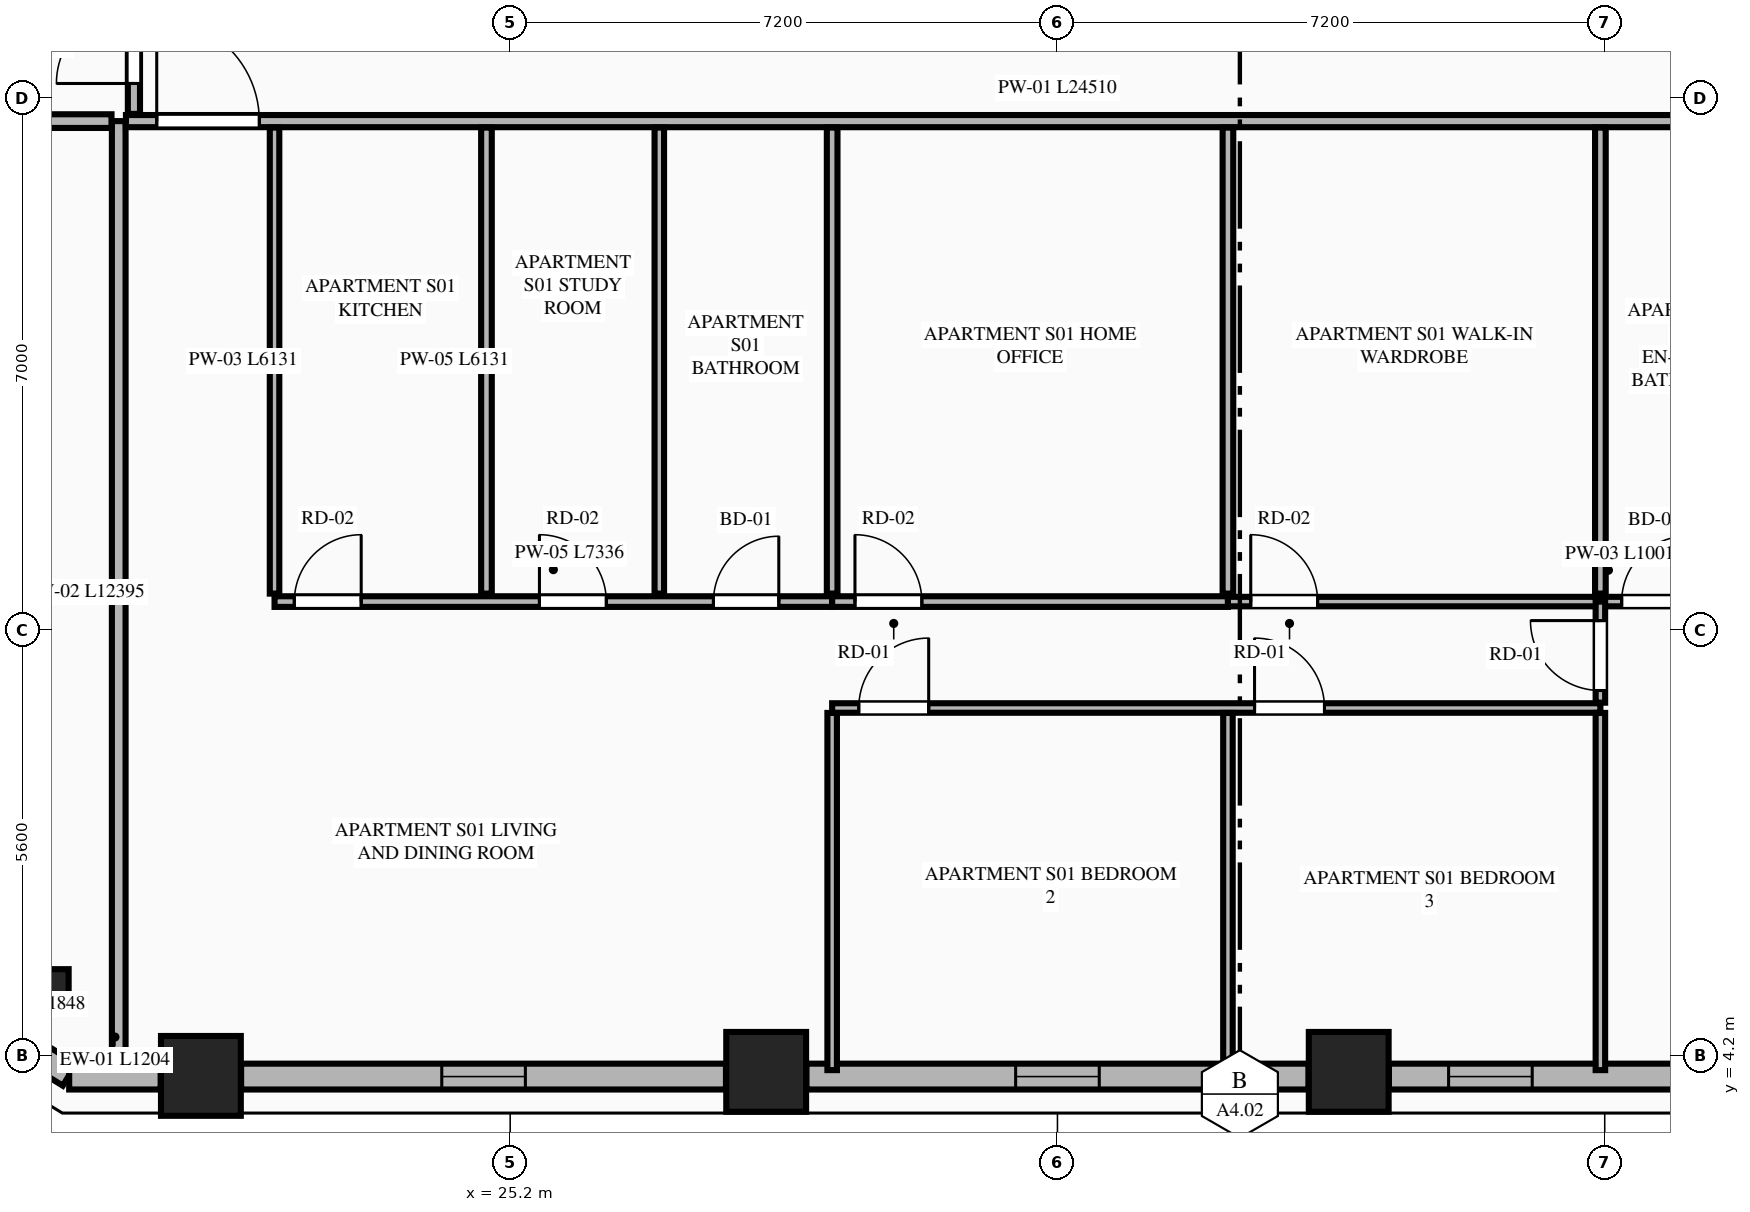
"""IFC4 building model, lengths in metres.
Left out: names, types, materials, properties, quantities, classifications, styles, units other than length and angle.
Written with IfcOpenShell. Run it as: python <this file> out.ifc"""

import sys

from ifc_helpers import new_model, si_unit, direction, frame, frame_2d, origin, origin_2d, place, context, subcontext, project, spatial, rectangle, extrude, element, fill, save


model = new_model("IFC4")
c1 = context("Model", 3, precision=1e-05, world=origin(), true_north=direction((0.0, 1.0)))
c2 = subcontext(c1, "Body", "Model", "MODEL_VIEW")
j1 = project(units=[si_unit("LENGTHUNIT", "METRE"), si_unit("PLANEANGLEUNIT", "RADIAN")], contexts=[c1])
p1 = place(None, origin())
s1 = spatial("IfcSite", under=j1, at=p1, CompositionType="ELEMENT")
p2 = place(p1, origin())
s2 = spatial("IfcBuilding", under=s1, at=p2, CompositionType="ELEMENT")
p3 = place(p2, frame((0.0, 0.0, 123.25)))
s3 = spatial("IfcBuildingStorey", under=s2, at=p3, CompositionType="ELEMENT", Elevation=123.25)
for number, where, z_axis, x_axis in (
    (1, (21.131, 3.939, 0.0), (0.0, 0.0, 1.0), (1.0, 0.0, 0.0)),
    (2, (28.568, 3.992, 0.0), (0.0, 0.0, 1.0), (1.0, 0.0, 0.0)),
    (3, (36.232, 3.992, 0.0), (0.0, 0.0, 1.0), (1.0, 0.0, 0.0)),
):
    element("IfcColumn", number, at=place(p3, frame(where, z_axis=z_axis, x_axis=x_axis)), inside=s3, PredefinedType="COLUMN", context=c2, shape_type="SweptSolid", body=[
        extrude(rectangle(XDim=1.05, YDim=1.05, at=origin_2d()), origin(), (0.0, 0.0, 1.0), 3.55),
    ])
p4 = place(p3, frame((19.141, 5.093, 0.0), z_axis=(0.0, 0.0, 1.0), x_axis=(0.865160173452, -0.501495637342, 0.0)))
e4 = element("IfcColumn", 4, at=p4, inside=s3, PredefinedType="PILASTER", context=c2, shape_type="SweptSolid", body=[
    extrude(rectangle(XDim=0.5, YDim=0.35, at=origin_2d()), origin(), (0.0, 0.0, 1.0), 3.55),
])
p5 = place(p3, frame((17.829, 4.923, 0.0), z_axis=(0.0, 0.0, 1.0), x_axis=(0.851798915137, -0.523868884523, 0.0)))
e5 = element("IfcWall", 5, at=p5, inside=s3, PredefinedType="STANDARD", context=c2, shape_type="SweptSolid", body=[
    extrude(rectangle(XDim=1.848, YDim=0.34, at=frame_2d((0.924, 0.0))), origin(), (0.0, 0.0, 1.0), 3.34),
])
p6 = place(p3, frame((19.398, 3.93, 0.0), z_axis=(0.0, 0.0, 1.0), x_axis=(1.0, 0.0, 0.0)))
e6 = element("IfcWall", 6, at=p6, inside=s3, PredefinedType="STANDARD", context=c2, shape_type="SweptSolid", body=[
    extrude(rectangle(XDim=1.204, YDim=0.34, at=frame_2d((0.602, 0.0))), origin(), (0.0, 0.0, 1.0), 3.34),
])
p7 = place(p3, frame((21.66, 3.93, 0.0), z_axis=(0.0, 0.0, 1.0), x_axis=(1.0, 0.0, 0.0)))
e7 = element("IfcWall", 7, at=p7, inside=s3, PredefinedType="STANDARD", context=c2, shape_type="SweptSolid", body=[
    extrude(rectangle(XDim=6.379, YDim=0.34, at=frame_2d((3.189, 0.0))), origin(), (0.0, 0.0, 1.0), 2.797),
])
p8 = place(p7, frame((2.64, 0.0, 0.75)))
e8 = element("IfcOpeningElement", 8, at=p8, cuts=e7, PredefinedType="OPENING", context=c2, shape_type="SweptSolid", body=[
    extrude(rectangle(XDim=1.1, YDim=1.897, at=frame_2d((0.55, 0.948))), frame((0.0, 0.18, 0.0), z_axis=(0.0, -1.0, 0.0), x_axis=(1.0, 0.0, 0.0)), (0.0, 0.0, 1.0), 0.36),
])
p9 = place(p3, frame((29.097, 3.93, 0.0), z_axis=(0.0, 0.0, 1.0), x_axis=(1.0, 0.0, 0.0)))
e9 = element("IfcWall", 9, at=p9, inside=s3, PredefinedType="STANDARD", context=c2, shape_type="SweptSolid", body=[
    extrude(rectangle(XDim=6.606, YDim=0.34, at=frame_2d((3.303, 0.0))), origin(), (0.0, 0.0, 1.0), 2.797),
])
p10 = place(p9, frame((2.753, 0.0, 0.75)))
e10 = element("IfcOpeningElement", 10, at=p10, cuts=e9, PredefinedType="OPENING", context=c2, shape_type="SweptSolid", body=[
    extrude(rectangle(XDim=1.1, YDim=1.897, at=frame_2d((0.55, 0.948))), frame((0.0, 0.18, 0.0), z_axis=(0.0, -1.0, 0.0), x_axis=(1.0, 0.0, 0.0)), (0.0, 0.0, 1.0), 0.36),
])
p11 = place(p3, frame((36.761, 3.93, 0.0), z_axis=(0.0, 0.0, 1.0), x_axis=(1.0, 0.0, 0.0)))
e11 = element("IfcWall", 11, at=p11, inside=s3, PredefinedType="STANDARD", context=c2, shape_type="SweptSolid", body=[
    extrude(rectangle(XDim=6.379, YDim=0.34, at=frame_2d((3.189, 0.0))), origin(), (0.0, 0.0, 1.0), 2.797),
])
p12 = place(p11, frame((0.785, 0.0, 0.75)))
e12 = element("IfcOpeningElement", 12, at=p12, cuts=e11, PredefinedType="OPENING", context=c2, shape_type="SweptSolid", body=[
    extrude(rectangle(XDim=1.1, YDim=1.897, at=frame_2d((0.55, 0.948))), frame((0.0, 0.18, 0.0), z_axis=(0.0, -1.0, 0.0), x_axis=(1.0, 0.0, 0.0)), (0.0, 0.0, 1.0), 0.36),
])
p13 = place(p11, frame((4.087, 0.0, 0.75)))
e13 = element("IfcOpeningElement", 13, at=p13, cuts=e11, PredefinedType="OPENING", context=c2, shape_type="SweptSolid", body=[
    extrude(rectangle(XDim=1.1, YDim=1.897, at=frame_2d((0.55, 0.948))), frame((0.0, 0.18, 0.0), z_axis=(0.0, -1.0, 0.0), x_axis=(1.0, 0.0, 0.0)), (0.0, 0.0, 1.0), 0.36),
])
p14 = place(p3, frame((20.05, 4.105, 0.0), z_axis=(0.0, 0.0, 1.0), x_axis=(0.0, 1.0, 0.0)))
e14 = element("IfcWall", 14, at=p14, inside=s3, PredefinedType="PARTITIONING", context=c2, shape_type="SweptSolid", body=[
    extrude(rectangle(XDim=12.395, YDim=0.18, at=frame_2d((6.198, 0.0))), origin(), (0.0, 0.0, 1.0), 3.34),
])
p15 = place(p3, frame((20.145, 16.5, 0.0), z_axis=(0.0, 0.0, 1.0), x_axis=(1.0, 0.0, 0.0)))
e15 = element("IfcWall", 15, at=p15, inside=s3, PredefinedType="PARTITIONING", context=c2, shape_type="SweptSolid", body=[
    extrude(rectangle(XDim=24.51, YDim=0.16, at=frame_2d((12.255, 0.0))), origin(), (0.0, 0.0, 1.0), 3.34),
])
p16 = place(p15, frame((0.405, 0.0, 0.0)))
e16 = element("IfcOpeningElement", 16, at=p16, cuts=e15, PredefinedType="OPENING", context=c2, shape_type="SweptSolid", body=[
    extrude(rectangle(XDim=1.35, YDim=2.35, at=frame_2d((0.675, 1.175))), frame((0.0, 0.09, 0.0), z_axis=(0.0, -1.0, 0.0), x_axis=(1.0, 0.0, 0.0)), (0.0, 0.0, 1.0), 0.18),
])
p17 = place(p3, frame((22.1, 10.284, 0.0), z_axis=(0.0, 0.0, 1.0), x_axis=(0.0, 1.0, 0.0)))
e17 = element("IfcWall", 17, at=p17, inside=s3, PredefinedType="PARTITIONING", context=c2, shape_type="SweptSolid", body=[
    extrude(rectangle(XDim=6.131, YDim=0.125, at=frame_2d((3.065, 0.0))), origin(), (0.0, 0.0, 1.0), 2.722),
])
p18 = place(p3, frame((22.1, 10.179, 0.0), z_axis=(0.0, 0.0, 1.0), x_axis=(1.0, 0.0, 0.0)))
e18 = element("IfcWall", 18, at=p18, inside=s3, PredefinedType="PLUMBINGWALL", context=c2, shape_type="SweptSolid", body=[
    extrude(rectangle(XDim=7.336, YDim=0.14, at=frame_2d((3.668, 0.0))), origin(), (0.0, 0.0, 1.0), 3.34),
])
p19 = place(p18, frame((5.774, 0.0, 0.0)))
e19 = element("IfcOpeningElement", 19, at=p19, cuts=e18, PredefinedType="OPENING", context=c2, shape_type="SweptSolid", body=[
    extrude(rectangle(XDim=0.86, YDim=2.1, at=frame_2d((0.43, 1.05))), frame((0.0, 0.08, 0.0), z_axis=(0.0, -1.0, 0.0), x_axis=(1.0, 0.0, 0.0)), (0.0, 0.0, 1.0), 0.16),
])
p20 = place(p18, frame((0.26, 0.0, 0.0)))
e20 = element("IfcOpeningElement", 20, at=p20, cuts=e18, PredefinedType="OPENING", context=c2, shape_type="SweptSolid", body=[
    extrude(rectangle(XDim=0.88, YDim=2.15, at=frame_2d((0.44, 1.075))), frame((0.0, 0.08, 0.0), z_axis=(0.0, -1.0, 0.0), x_axis=(1.0, 0.0, 0.0)), (0.0, 0.0, 1.0), 0.16),
])
p21 = place(p18, frame((3.485, 0.0, 0.0)))
e21 = element("IfcOpeningElement", 21, at=p21, cuts=e18, PredefinedType="OPENING", context=c2, shape_type="SweptSolid", body=[
    extrude(rectangle(XDim=0.88, YDim=2.15, at=frame_2d((0.44, 1.075))), frame((0.0, 0.08, 0.0), z_axis=(0.0, -1.0, 0.0), x_axis=(1.0, 0.0, 0.0)), (0.0, 0.0, 1.0), 0.16),
])
p22 = place(p3, frame((29.436, 10.179, 0.0), z_axis=(0.0, 0.0, 1.0), x_axis=(1.0, 0.0, 0.0)))
e22 = element("IfcWall", 22, at=p22, inside=s3, PredefinedType="PLUMBINGWALL", context=c2, shape_type="SweptSolid", body=[
    extrude(rectangle(XDim=5.207, YDim=0.14, at=frame_2d((2.604, 0.0))), origin(), (0.0, 0.0, 1.0), 3.34),
])
p23 = place(p22, frame((0.3, 0.0, 0.0)))
e23 = element("IfcOpeningElement", 23, at=p23, cuts=e22, PredefinedType="OPENING", context=c2, shape_type="SweptSolid", body=[
    extrude(rectangle(XDim=0.88, YDim=2.15, at=frame_2d((0.44, 1.075))), frame((0.0, 0.08, 0.0), z_axis=(0.0, -1.0, 0.0), x_axis=(1.0, 0.0, 0.0)), (0.0, 0.0, 1.0), 0.16),
])
p24 = place(p3, frame((34.643, 10.179, 0.0), z_axis=(0.0, 0.0, 1.0), x_axis=(1.0, 0.0, 0.0)))
e24 = element("IfcWall", 24, at=p24, inside=s3, PredefinedType="PARTITIONING", context=c2, shape_type="SweptSolid", body=[
    extrude(rectangle(XDim=10.012, YDim=0.125, at=frame_2d((5.006, 0.0))), origin(), (0.0, 0.0, 1.0), 3.34),
])
p25 = place(p24, frame((5.18, 0.0, 0.0)))
e25 = element("IfcOpeningElement", 25, at=p25, cuts=e24, PredefinedType="OPENING", context=c2, shape_type="SweptSolid", body=[
    extrude(rectangle(XDim=0.86, YDim=2.1, at=frame_2d((0.43, 1.05))), frame((0.0, 0.073, 0.0), z_axis=(0.0, -1.0, 0.0), x_axis=(1.0, 0.0, 0.0)), (0.0, 0.0, 1.0), 0.145),
])
p26 = place(p24, frame((7.42, 0.0, 0.0)))
e26 = element("IfcOpeningElement", 26, at=p26, cuts=e24, PredefinedType="OPENING", context=c2, shape_type="SweptSolid", body=[
    extrude(rectangle(XDim=0.88, YDim=2.15, at=frame_2d((0.44, 1.075))), frame((0.0, 0.073, 0.0), z_axis=(0.0, -1.0, 0.0), x_axis=(1.0, 0.0, 0.0)), (0.0, 0.0, 1.0), 0.145),
])
p27 = place(p24, frame((0.3, 0.0, 0.0)))
e27 = element("IfcOpeningElement", 27, at=p27, cuts=e24, PredefinedType="OPENING", context=c2, shape_type="SweptSolid", body=[
    extrude(rectangle(XDim=0.88, YDim=2.15, at=frame_2d((0.44, 1.075))), frame((0.0, 0.073, 0.0), z_axis=(0.0, -1.0, 0.0), x_axis=(1.0, 0.0, 0.0)), (0.0, 0.0, 1.0), 0.145),
])
p28 = place(p3, frame((24.888, 10.284, 0.0), z_axis=(0.0, 0.0, 1.0), x_axis=(0.0, 1.0, 0.0)))
e28 = element("IfcWall", 28, at=p28, inside=s3, PredefinedType="PLUMBINGWALL", context=c2, shape_type="SweptSolid", body=[
    extrude(rectangle(XDim=6.131, YDim=0.14, at=frame_2d((3.065, 0.0))), origin(), (0.0, 0.0, 1.0), 3.34),
])
p29 = place(p3, frame((27.162, 10.284, 0.0), z_axis=(0.0, 0.0, 1.0), x_axis=(0.0, 1.0, 0.0)))
e29 = element("IfcWall", 29, at=p29, inside=s3, PredefinedType="PARTITIONING", context=c2, shape_type="SweptSolid", body=[
    extrude(rectangle(XDim=6.131, YDim=0.125, at=frame_2d((3.065, 0.0))), origin(), (0.0, 0.0, 1.0), 3.34),
])
p30 = place(p3, frame((29.436, 4.015, 0.0), z_axis=(0.0, 0.0, 1.0), x_axis=(0.0, 1.0, 0.0)))
e30 = element("IfcWall", 30, at=p30, inside=s3, PredefinedType="PARTITIONING", context=c2, shape_type="SweptSolid", body=[
    extrude(rectangle(XDim=4.699, YDim=0.125, at=frame_2d((2.35, 0.0))), origin(), (0.0, 0.0, 1.0), 3.34),
])
p31 = place(p3, frame((29.436, 8.779, 0.0), z_axis=(0.0, 0.0, 1.0), x_axis=(1.0, 0.0, 0.0)))
e31 = element("IfcWall", 31, at=p31, inside=s3, PredefinedType="PARTITIONING", context=c2, shape_type="SweptSolid", body=[
    extrude(rectangle(XDim=10.107, YDim=0.125, at=frame_2d((5.053, 0.0))), origin(), (0.0, 0.0, 1.0), 3.34),
])
p32 = place(p31, frame((0.35, 0.0, 0.0)))
e32 = element("IfcOpeningElement", 32, at=p32, cuts=e31, PredefinedType="OPENING", context=c2, shape_type="SweptSolid", body=[
    extrude(rectangle(XDim=0.92, YDim=2.15, at=frame_2d((0.46, 1.075))), frame((0.0, 0.073, 0.0), z_axis=(0.0, -1.0, 0.0), x_axis=(1.0, 0.0, 0.0)), (0.0, 0.0, 1.0), 0.145),
])
p33 = place(p31, frame((5.557, 0.0, 0.0)))
e33 = element("IfcOpeningElement", 33, at=p33, cuts=e31, PredefinedType="OPENING", context=c2, shape_type="SweptSolid", body=[
    extrude(rectangle(XDim=0.92, YDim=2.15, at=frame_2d((0.46, 1.075))), frame((0.0, 0.073, 0.0), z_axis=(0.0, -1.0, 0.0), x_axis=(1.0, 0.0, 0.0)), (0.0, 0.0, 1.0), 0.145),
])
p34 = place(p3, frame((39.543, 8.849, 0.0), z_axis=(0.0, 0.0, 1.0), x_axis=(0.0, 1.0, 0.0)))
e34 = element("IfcWall", 34, at=p34, inside=s3, PredefinedType="PARTITIONING", context=c2, shape_type="SweptSolid", body=[
    extrude(rectangle(XDim=1.33, YDim=0.125, at=frame_2d((0.665, 0.0))), origin(), (0.0, 0.0, 1.0), 3.34),
])
p35 = place(p34, frame((0.16, 0.0, 0.0)))
e35 = element("IfcOpeningElement", 35, at=p35, cuts=e34, PredefinedType="OPENING", context=c2, shape_type="SweptSolid", body=[
    extrude(rectangle(XDim=0.92, YDim=2.15, at=frame_2d((0.46, 1.075))), frame((0.0, 0.073, 0.0), z_axis=(0.0, -1.0, 0.0), x_axis=(1.0, 0.0, 0.0)), (0.0, 0.0, 1.0), 0.145),
])
for number, where, z_axis, x_axis in (
    (36, (29.436, 10.284, 0.0), (0.0, 0.0, 1.0), (0.0, 1.0, 0.0)),
    (37, (34.643, 10.284, 0.0), (0.0, 0.0, 1.0), (0.0, 1.0, 0.0)),
):
    element("IfcWall", number, at=place(p3, frame(where, z_axis=z_axis, x_axis=x_axis)), inside=s3, PredefinedType="PLUMBINGWALL", context=c2, shape_type="SweptSolid", body=[
        extrude(rectangle(XDim=6.131, YDim=0.14, at=frame_2d((3.065, 0.0))), origin(), (0.0, 0.0, 1.0), 3.34),
    ])
for number, where, z_axis, x_axis in (
    (38, (34.643, 4.015, 0.0), (0.0, 0.0, 1.0), (0.0, 1.0, 0.0)),
    (39, (39.543, 4.015, 0.0), (0.0, 0.0, 1.0), (0.0, 1.0, 0.0)),
):
    element("IfcWall", number, at=place(p3, frame(where, z_axis=z_axis, x_axis=x_axis)), inside=s3, PredefinedType="PARTITIONING", context=c2, shape_type="SweptSolid", body=[
        extrude(rectangle(XDim=4.699, YDim=0.125, at=frame_2d((2.35, 0.0))), origin(), (0.0, 0.0, 1.0), 3.34),
    ])
p36 = place(p3, frame((39.543, 10.284, 0.0), z_axis=(0.0, 0.0, 1.0), x_axis=(0.0, 1.0, 0.0)))
e40 = element("IfcWall", 40, at=p36, inside=s3, PredefinedType="PLUMBINGWALL", context=c2, shape_type="SweptSolid", body=[
    extrude(rectangle(XDim=6.131, YDim=0.14, at=frame_2d((3.065, 0.0))), origin(), (0.0, 0.0, 1.0), 3.34),
])
p37 = place(p3, frame((12.185, 16.5, 0.0), z_axis=(0.0, 0.0, 1.0), x_axis=(1.0, 0.0, 0.0)))
e41 = element("IfcWall", 41, at=p37, inside=s3, PredefinedType="PARTITIONING", context=c2, shape_type="SweptSolid", body=[
    extrude(rectangle(XDim=7.77, YDim=0.18, at=frame_2d((3.885, 0.0))), origin(), (0.0, 0.0, 1.0), 3.34),
])
p38 = place(p3, frame((20.25, 16.595, 0.0), z_axis=(0.0, 0.0, 1.0), x_axis=(0.0, 1.0, 0.0)))
e42 = element("IfcWall", 42, at=p38, inside=s3, PredefinedType="PARTITIONING", context=c2, shape_type="SweptSolid", body=[
    extrude(rectangle(XDim=6.202, YDim=0.16, at=frame_2d((3.101, 0.0))), origin(), (0.0, 0.0, 1.0), 3.34),
])
p39 = place(p38, frame((0.4, 0.0, 0.0)))
e43 = element("IfcOpeningElement", 43, at=p39, cuts=e42, PredefinedType="OPENING", context=c2, shape_type="SweptSolid", body=[
    extrude(rectangle(XDim=1.02, YDim=2.25, at=frame_2d((0.51, 1.125))), frame((0.0, 0.09, 0.0), z_axis=(0.0, -1.0, 0.0), x_axis=(1.0, 0.0, 0.0)), (0.0, 0.0, 1.0), 0.18),
])
p40 = place(p8, origin())
e44 = element("IfcWindow", 44, at=p40, inside=s3, PartitioningType="SINGLE_PANEL", PredefinedType="WINDOW", context=c2, shape_type="SweptSolid", body=[
    extrude(rectangle(XDim=1.1, YDim=1.897, at=frame_2d((0.55, 0.948))), frame((0.0, 0.03, 0.0), z_axis=(0.0, -1.0, 0.0), x_axis=(1.0, 0.0, 0.0)), (0.0, 0.0, 1.0), 0.06),
])
fill(e8, e44)
p41 = place(p10, origin())
e45 = element("IfcWindow", 45, at=p41, inside=s3, PartitioningType="SINGLE_PANEL", PredefinedType="WINDOW", context=c2, shape_type="SweptSolid", body=[
    extrude(rectangle(XDim=1.1, YDim=1.897, at=frame_2d((0.55, 0.948))), frame((0.0, 0.03, 0.0), z_axis=(0.0, -1.0, 0.0), x_axis=(1.0, 0.0, 0.0)), (0.0, 0.0, 1.0), 0.06),
])
fill(e10, e45)
p42 = place(p12, origin())
e46 = element("IfcWindow", 46, at=p42, inside=s3, PartitioningType="SINGLE_PANEL", PredefinedType="WINDOW", context=c2, shape_type="SweptSolid", body=[
    extrude(rectangle(XDim=1.1, YDim=1.897, at=frame_2d((0.55, 0.948))), frame((0.0, 0.03, 0.0), z_axis=(0.0, -1.0, 0.0), x_axis=(1.0, 0.0, 0.0)), (0.0, 0.0, 1.0), 0.06),
])
fill(e12, e46)
p43 = place(p19, origin())
e47 = element("IfcDoor", 47, at=p43, inside=s3, OperationType="SINGLE_SWING_RIGHT", PredefinedType="DOOR", context=c2, shape_type="SweptSolid", body=[
    extrude(rectangle(XDim=0.86, YDim=2.1, at=frame_2d((0.43, 1.05))), frame((0.0, 0.025, 0.0), z_axis=(0.0, -1.0, 0.0), x_axis=(1.0, 0.0, 0.0)), (0.0, 0.0, 1.0), 0.05),
])
fill(e19, e47)
p44 = place(p25, origin())
e48 = element("IfcDoor", 48, at=p44, inside=s3, OperationType="SINGLE_SWING_RIGHT", PredefinedType="DOOR", context=c2, shape_type="SweptSolid", body=[
    extrude(rectangle(XDim=0.86, YDim=2.1, at=frame_2d((0.43, 1.05))), frame((0.0, 0.025, 0.0), z_axis=(0.0, -1.0, 0.0), x_axis=(1.0, 0.0, 0.0)), (0.0, 0.0, 1.0), 0.05),
])
fill(e25, e48)
p45 = place(p16, origin())
e49 = element("IfcDoor", 49, at=p45, inside=s3, OperationType="SINGLE_SWING_LEFT", PredefinedType="DOOR", context=c2, shape_type="SweptSolid", body=[
    extrude(rectangle(XDim=1.35, YDim=2.35, at=frame_2d((0.675, 1.175))), frame((0.0, 0.025, 0.0), z_axis=(0.0, -1.0, 0.0), x_axis=(1.0, 0.0, 0.0)), (0.0, 0.0, 1.0), 0.05),
])
fill(e16, e49)
p46 = place(p20, origin())
e50 = element("IfcDoor", 50, at=p46, inside=s3, OperationType="SINGLE_SWING_RIGHT", PredefinedType="DOOR", context=c2, shape_type="SweptSolid", body=[
    extrude(rectangle(XDim=0.88, YDim=2.15, at=frame_2d((0.44, 1.075))), frame((0.0, 0.025, 0.0), z_axis=(0.0, -1.0, 0.0), x_axis=(1.0, 0.0, 0.0)), (0.0, 0.0, 1.0), 0.05),
])
fill(e20, e50)
p47 = place(p21, origin())
e51 = element("IfcDoor", 51, at=p47, inside=s3, OperationType="SINGLE_SWING_LEFT", PredefinedType="DOOR", context=c2, shape_type="SweptSolid", body=[
    extrude(rectangle(XDim=0.88, YDim=2.15, at=frame_2d((0.44, 1.075))), frame((0.0, 0.025, 0.0), z_axis=(0.0, -1.0, 0.0), x_axis=(1.0, 0.0, 0.0)), (0.0, 0.0, 1.0), 0.05),
])
fill(e21, e51)
p48 = place(p23, origin())
e52 = element("IfcDoor", 52, at=p48, inside=s3, OperationType="SINGLE_SWING_LEFT", PredefinedType="DOOR", context=c2, shape_type="SweptSolid", body=[
    extrude(rectangle(XDim=0.88, YDim=2.15, at=frame_2d((0.44, 1.075))), frame((0.0, 0.025, 0.0), z_axis=(0.0, -1.0, 0.0), x_axis=(1.0, 0.0, 0.0)), (0.0, 0.0, 1.0), 0.05),
])
fill(e23, e52)
p49 = place(p32, origin())
e53 = element("IfcDoor", 53, at=p49, inside=s3, OperationType="SINGLE_SWING_RIGHT", PredefinedType="DOOR", context=c2, shape_type="SweptSolid", body=[
    extrude(rectangle(XDim=0.92, YDim=2.15, at=frame_2d((0.46, 1.075))), frame((0.0, 0.025, 0.0), z_axis=(0.0, -1.0, 0.0), x_axis=(1.0, 0.0, 0.0)), (0.0, 0.0, 1.0), 0.05),
])
fill(e32, e53)
p50 = place(p33, origin())
e54 = element("IfcDoor", 54, at=p50, inside=s3, OperationType="SINGLE_SWING_LEFT", PredefinedType="DOOR", context=c2, shape_type="SweptSolid", body=[
    extrude(rectangle(XDim=0.92, YDim=2.15, at=frame_2d((0.46, 1.075))), frame((0.0, 0.025, 0.0), z_axis=(0.0, -1.0, 0.0), x_axis=(1.0, 0.0, 0.0)), (0.0, 0.0, 1.0), 0.05),
])
fill(e33, e54)
p51 = place(p35, origin())
e55 = element("IfcDoor", 55, at=p51, inside=s3, OperationType="SINGLE_SWING_RIGHT", PredefinedType="DOOR", context=c2, shape_type="SweptSolid", body=[
    extrude(rectangle(XDim=0.92, YDim=2.15, at=frame_2d((0.46, 1.075))), frame((0.0, 0.025, 0.0), z_axis=(0.0, -1.0, 0.0), x_axis=(1.0, 0.0, 0.0)), (0.0, 0.0, 1.0), 0.05),
])
fill(e35, e55)
p52 = place(p27, origin())
e56 = element("IfcDoor", 56, at=p52, inside=s3, OperationType="SINGLE_SWING_LEFT", PredefinedType="DOOR", context=c2, shape_type="SweptSolid", body=[
    extrude(rectangle(XDim=0.88, YDim=2.15, at=frame_2d((0.44, 1.075))), frame((0.0, 0.025, 0.0), z_axis=(0.0, -1.0, 0.0), x_axis=(1.0, 0.0, 0.0)), (0.0, 0.0, 1.0), 0.05),
])
fill(e27, e56)
p53 = place(p39, origin())
e57 = element("IfcDoor", 57, at=p53, inside=s3, OperationType="SINGLE_SWING_LEFT", PredefinedType="DOOR", context=c2, shape_type="SweptSolid", body=[
    extrude(rectangle(XDim=1.02, YDim=2.25, at=frame_2d((0.51, 1.125))), frame((0.0, 0.025, 0.0), z_axis=(0.0, -1.0, 0.0), x_axis=(1.0, 0.0, 0.0)), (0.0, 0.0, 1.0), 0.05),
])
fill(e43, e57)
save(model, sys.argv[1])
